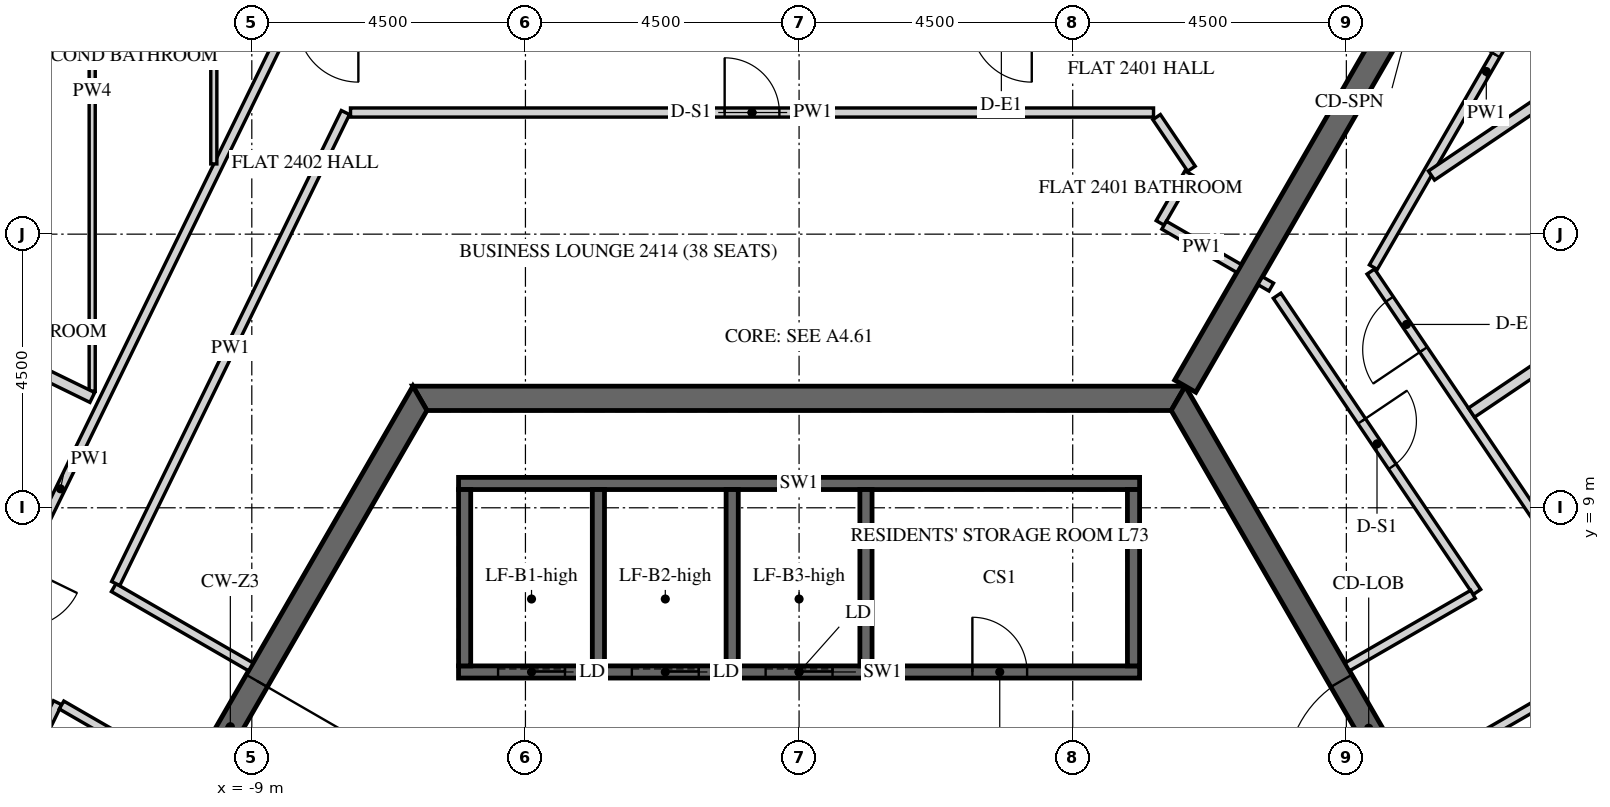
"""IFC4 building model, lengths in metres.
Left out: names, types, materials, properties, quantities, classifications, styles, units other than length and angle.
Written with IfcOpenShell. Run it as: python <this file> out.ifc"""

import sys

from ifc_helpers import new_model, si_unit, direction, frame, frame_2d, origin, place, context, subcontext, project, spatial, polyline, rectangle, outline, extrude, element, fill, save


model = new_model("IFC4")
c1 = context("Model", 3, precision=1e-05, world=origin(), true_north=direction((0.0, 1.0)))
c2 = subcontext(c1, "Body", "Model", "MODEL_VIEW")
j1 = project(units=[si_unit("LENGTHUNIT", "METRE"), si_unit("PLANEANGLEUNIT", "RADIAN")], contexts=[c1])
p1 = place(None, origin())
s1 = spatial("IfcSite", under=j1, at=p1, CompositionType="ELEMENT")
p2 = place(p1, origin())
s2 = spatial("IfcBuilding", under=s1, at=p2, CompositionType="ELEMENT")
p3 = place(p2, frame((0.0, 0.0, 303.0)))
s3 = spatial("IfcBuildingStorey", under=s2, at=p3, CompositionType="ELEMENT", Elevation=303.0)
p4 = place(p3, frame((-6.235, 10.8, -0.15), z_axis=(0.0, 0.0, 1.0), x_axis=(-0.499996419489, -0.866027470984, 0.0)))
e1 = element("IfcWall", 1, at=p4, inside=s3, PredefinedType="SHEAR", context=c2, shape_type="SweptSolid", body=[
    extrude(outline(polyline([(-0.115, -0.2), (12.586, -0.2), (12.355, 0.2), (0.115, 0.2), (-0.115, -0.2)])), origin(), (0.0, 0.0, 1.0), 3.9),
])
p5 = place(p4, frame((5.364, 0.0, 0.15)))
e2 = element("IfcOpeningElement", 2, at=p5, cuts=e1, PredefinedType="OPENING", context=c2, shape_type="SweptSolid", body=[
    extrude(rectangle(XDim=1.8, YDim=2.4, at=frame_2d((0.9, 1.2))), frame((0.0, 0.21, 0.0), z_axis=(0.0, -1.0, 0.0), x_axis=(1.0, 0.0, 0.0)), (0.0, 0.0, 1.0), 0.42),
])
p6 = place(p3, frame((12.471, 0.0, -0.15), z_axis=(0.0, 0.0, 1.0), x_axis=(-0.499996419489, 0.866027470984, 0.0)))
e3 = element("IfcWall", 3, at=p6, inside=s3, PredefinedType="SHEAR", context=c2, shape_type="SweptSolid", body=[
    extrude(outline(polyline([(-0.115, -0.2), (12.586, -0.2), (12.355, 0.2), (0.115, 0.2), (-0.115, -0.2)])), origin(), (0.0, 0.0, 1.0), 3.9),
])
p7 = place(p6, frame((5.306, 0.0, 0.15)))
e4 = element("IfcOpeningElement", 4, at=p7, cuts=e3, PredefinedType="OPENING", context=c2, shape_type="SweptSolid", body=[
    extrude(rectangle(XDim=1.8, YDim=2.4, at=frame_2d((0.9, 1.2))), frame((0.0, 0.21, 0.0), z_axis=(0.0, -1.0, 0.0), x_axis=(1.0, 0.0, 0.0)), (0.0, 0.0, 1.0), 0.42),
])
p8 = place(p3, frame((6.235, 10.8, -0.15), z_axis=(0.0, 0.0, 1.0), x_axis=(-1.0, 0.0, 0.0)))
e5 = element("IfcWall", 5, at=p8, inside=s3, PredefinedType="SHEAR", context=c2, shape_type="SweptSolid", body=[
    extrude(outline(polyline([(-0.115, -0.2), (12.586, -0.2), (12.355, 0.2), (0.115, 0.2), (-0.115, -0.2)])), origin(), (0.0, 0.0, 1.0), 3.9),
])
p9 = place(p3, frame((6.351, 11.0, -0.15), z_axis=(0.0, 0.0, 1.0), x_axis=(0.499998894578, 0.866026041999, 0.0)))
e6 = element("IfcWall", 6, at=p9, inside=s3, PredefinedType="SHEAR", context=c2, shape_type="SweptSolid", body=[
    extrude(rectangle(XDim=15.544, YDim=0.4, at=frame_2d((7.772, 0.0))), origin(), (0.0, 0.0, 1.0), 3.9),
])
p10 = place(p9, frame((6.872, 0.0, 0.15)))
e7 = element("IfcOpeningElement", 7, at=p10, cuts=e6, PredefinedType="OPENING", context=c2, shape_type="SweptSolid", body=[
    extrude(rectangle(XDim=1.8, YDim=2.4, at=frame_2d((0.9, 1.2))), frame((0.0, 0.21, 0.0), z_axis=(0.0, -1.0, 0.0), x_axis=(1.0, 0.0, 0.0)), (0.0, 0.0, 1.0), 0.42),
])
p11 = place(p3, frame((-5.6, 6.3, -0.25), z_axis=(0.0, 0.0, 1.0), x_axis=(1.0, 0.0, 0.0)))
e8 = element("IfcWall", 8, at=p11, inside=s3, PredefinedType="SHEAR", context=c2, shape_type="SweptSolid", body=[
    extrude(rectangle(XDim=11.2, YDim=0.2, at=frame_2d((5.6, 0.0))), origin(), (0.0, 0.0, 1.0), 3.9),
])
p12 = place(p11, frame((8.45, 0.0, 0.25)))
e9 = element("IfcOpeningElement", 9, at=p12, cuts=e8, PredefinedType="OPENING", context=c2, shape_type="SweptSolid", body=[
    extrude(rectangle(XDim=0.9, YDim=2.1, at=frame_2d((0.45, 1.05))), frame((0.0, 0.11, 0.0), z_axis=(0.0, -1.0, 0.0), x_axis=(1.0, 0.0, 0.0)), (0.0, 0.0, 1.0), 0.22),
])
p13 = place(p11, frame((0.65, 0.0, 0.25)))
e10 = element("IfcOpeningElement", 10, at=p13, cuts=e8, PredefinedType="OPENING", context=c2, shape_type="SweptSolid", body=[
    extrude(rectangle(XDim=1.1, YDim=2.1, at=frame_2d((0.55, 1.05))), frame((0.0, 0.11, 0.0), z_axis=(0.0, -1.0, 0.0), x_axis=(1.0, 0.0, 0.0)), (0.0, 0.0, 1.0), 0.22),
])
p14 = place(p11, frame((2.85, 0.0, 0.25)))
e11 = element("IfcOpeningElement", 11, at=p14, cuts=e8, PredefinedType="OPENING", context=c2, shape_type="SweptSolid", body=[
    extrude(rectangle(XDim=1.1, YDim=2.1, at=frame_2d((0.55, 1.05))), frame((0.0, 0.11, 0.0), z_axis=(0.0, -1.0, 0.0), x_axis=(1.0, 0.0, 0.0)), (0.0, 0.0, 1.0), 0.22),
])
p15 = place(p11, frame((5.05, 0.0, 0.25)))
e12 = element("IfcOpeningElement", 12, at=p15, cuts=e8, PredefinedType="OPENING", context=c2, shape_type="SweptSolid", body=[
    extrude(rectangle(XDim=1.1, YDim=2.1, at=frame_2d((0.55, 1.05))), frame((0.0, 0.11, 0.0), z_axis=(0.0, -1.0, 0.0), x_axis=(1.0, 0.0, 0.0)), (0.0, 0.0, 1.0), 0.22),
])
p16 = place(p3, frame((-5.6, 9.4, -0.25), z_axis=(0.0, 0.0, 1.0), x_axis=(1.0, 0.0, 0.0)))
e13 = element("IfcWall", 13, at=p16, inside=s3, PredefinedType="SHEAR", context=c2, shape_type="SweptSolid", body=[
    extrude(rectangle(XDim=11.2, YDim=0.2, at=frame_2d((5.6, 0.0))), origin(), (0.0, 0.0, 1.0), 3.9),
])
for number, where, z_axis, x_axis in (
    (14, (-5.5, 6.4, -0.25), (0.0, 0.0, 1.0), (0.0, 1.0, 0.0)),
    (15, (-3.3, 6.4, -0.25), (0.0, 0.0, 1.0), (0.0, 1.0, 0.0)),
    (16, (-1.1, 6.4, -0.25), (0.0, 0.0, 1.0), (0.0, 1.0, 0.0)),
    (17, (1.1, 6.4, -0.25), (0.0, 0.0, 1.0), (0.0, 1.0, 0.0)),
    (18, (5.5, 6.4, -0.25), (0.0, 0.0, 1.0), (0.0, 1.0, 0.0)),
):
    element("IfcWall", number, at=place(p3, frame(where, z_axis=z_axis, x_axis=x_axis)), inside=s3, PredefinedType="SHEAR", context=c2, shape_type="SweptSolid", body=[
        extrude(rectangle(XDim=2.9, YDim=0.2, at=frame_2d((1.45, 0.0))), origin(), (0.0, 0.0, 1.0), 3.9),
    ])
p17 = place(p3, frame((-8.434, 16.925, 0.0), z_axis=(0.0, 0.0, 1.0), x_axis=(-0.438371383278, -0.898793930956, 0.0)))
e19 = element("IfcWall", 19, at=p17, inside=s3, PredefinedType="PARTITIONING", context=c2, shape_type="SweptSolid", body=[
    extrude(rectangle(XDim=16.939, YDim=0.15, at=frame_2d((8.47, 0.0))), origin(), (0.0, 0.0, 1.0), 2.988),
])
p18 = place(p17, frame((9.89, 0.0, 0.0)))
e20 = element("IfcOpeningElement", 20, at=p18, cuts=e19, PredefinedType="OPENING", context=c2, shape_type="SweptSolid", body=[
    extrude(rectangle(XDim=1.0, YDim=2.1, at=frame_2d((0.5, 1.05))), frame((0.0, 0.085, 0.0), z_axis=(0.0, -1.0, 0.0), x_axis=(1.0, 0.0, 0.0)), (0.0, 0.0, 1.0), 0.17),
])
p19 = place(p3, frame((-9.016, 6.384, 0.0), z_axis=(0.0, 0.0, 1.0), x_axis=(-0.866031051173, 0.499990218309, 0.0)))
e21 = element("IfcWall", 21, at=p19, inside=s3, PredefinedType="PARTITIONING", context=c2, shape_type="SweptSolid", body=[
    extrude(rectangle(XDim=2.604, YDim=0.15, at=frame_2d((1.302, 0.0))), origin(), (0.0, 0.0, 1.0), 2.988),
])
p20 = place(p3, frame((-11.238, 7.754, 0.0), z_axis=(0.0, 0.0, 1.0), x_axis=(0.438387352899, 0.89878614187, 0.0)))
e22 = element("IfcWall", 22, at=p20, inside=s3, PredefinedType="PARTITIONING", context=c2, shape_type="SweptSolid", body=[
    extrude(rectangle(XDim=8.618, YDim=0.15, at=frame_2d((4.309, 0.0))), origin(), (0.0, 0.0, 1.0), 2.988),
])
p21 = place(p3, frame((-7.377, 15.5, 0.0), z_axis=(0.0, 0.0, 1.0), x_axis=(1.0, 0.0, 0.0)))
e23 = element("IfcWall", 23, at=p21, inside=s3, PredefinedType="PARTITIONING", context=c2, shape_type="SweptSolid", body=[
    extrude(rectangle(XDim=13.206, YDim=0.15, at=frame_2d((6.603, 0.0))), origin(), (0.0, 0.0, 1.0), 2.988),
])
p22 = place(p21, frame((6.153, 0.0, 0.0)))
e24 = element("IfcOpeningElement", 24, at=p22, cuts=e23, PredefinedType="OPENING", context=c2, shape_type="SweptSolid", body=[
    extrude(rectangle(XDim=0.9, YDim=2.1, at=frame_2d((0.45, 1.05))), frame((0.0, 0.085, 0.0), z_axis=(0.0, -1.0, 0.0), x_axis=(1.0, 0.0, 0.0)), (0.0, 0.0, 1.0), 0.17),
])
p23 = place(p3, frame((5.88, 15.425, 0.0), z_axis=(0.0, 0.0, 1.0), x_axis=(0.559202631314, -0.829031010959, 0.0)))
e25 = element("IfcWall", 25, at=p23, inside=s3, PredefinedType="PARTITIONING", context=c2, shape_type="SweptSolid", body=[
    extrude(rectangle(XDim=1.024, YDim=0.15, at=frame_2d((0.512, 0.0))), origin(), (0.0, 0.0, 1.0), 2.988),
])
p24 = place(p3, frame((6.411, 14.504, 0.0), z_axis=(0.0, 0.0, 1.0), x_axis=(-0.499998034377, -0.866026538634, 0.0)))
e26 = element("IfcWall", 26, at=p24, inside=s3, PredefinedType="PARTITIONING", context=c2, shape_type="SweptSolid", body=[
    extrude(rectangle(XDim=0.946, YDim=0.15, at=frame_2d((0.473, 0.0))), origin(), (0.0, 0.0, 1.0), 2.988),
])
p25 = place(p3, frame((6.003, 13.647, 0.0), z_axis=(0.0, 0.0, 1.0), x_axis=(0.865988727248, -0.500063520245, 0.0)))
e27 = element("IfcWall", 27, at=p25, inside=s3, PredefinedType="PARTITIONING", context=c2, shape_type="SweptSolid", body=[
    extrude(rectangle(XDim=1.425, YDim=0.15, at=frame_2d((0.712, 0.0))), origin(), (0.0, 0.0, 1.0), 2.988),
])
p26 = place(p3, frame((-14.745, 0.564, 0.0), z_axis=(0.0, 0.0, 1.0), x_axis=(0.438348416625, 0.898805132185, 0.0)))
e28 = element("IfcWall", 28, at=p26, inside=s3, PredefinedType="PARTITIONING", context=c2, shape_type="SweptSolid", body=[
    extrude(rectangle(XDim=5.82, YDim=0.15, at=frame_2d((2.91, 0.0))), origin(), (0.0, 0.0, 1.0), 2.988),
])
p27 = place(p26, frame((2.46, 0.0, 0.0)))
e29 = element("IfcOpeningElement", 29, at=p27, cuts=e28, PredefinedType="OPENING", context=c2, shape_type="SweptSolid", body=[
    extrude(rectangle(XDim=0.9, YDim=2.1, at=frame_2d((0.45, 1.05))), frame((0.0, 0.085, 0.0), z_axis=(0.0, -1.0, 0.0), x_axis=(1.0, 0.0, 0.0)), (0.0, 0.0, 1.0), 0.17),
])
p28 = place(p3, frame((-12.129, 5.757, 0.0), z_axis=(0.0, 0.0, 1.0), x_axis=(0.866033707122, -0.499985617921, 0.0)))
e30 = element("IfcWall", 30, at=p28, inside=s3, PredefinedType="PARTITIONING", context=c2, shape_type="SweptSolid", body=[
    extrude(rectangle(XDim=2.382, YDim=0.15, at=frame_2d((1.191, 0.0))), origin(), (0.0, 0.0, 1.0), 2.988),
])
p29 = place(p3, frame((18.875, -1.158, 0.0), z_axis=(0.0, 0.0, 1.0), x_axis=(-0.55919880344, 0.829033592945, 0.0)))
e31 = element("IfcWall", 31, at=p29, inside=s3, PredefinedType="PARTITIONING", context=c2, shape_type="SweptSolid", body=[
    extrude(rectangle(XDim=16.939, YDim=0.15, at=frame_2d((8.47, 0.0))), origin(), (0.0, 0.0, 1.0), 2.988),
])
p30 = place(p29, frame((4.09, 0.0, 0.0)))
e32 = element("IfcOpeningElement", 32, at=p30, cuts=e31, PredefinedType="OPENING", context=c2, shape_type="SweptSolid", body=[
    extrude(rectangle(XDim=1.0, YDim=2.1, at=frame_2d((0.5, 1.05))), frame((0.0, 0.085, 0.0), z_axis=(0.0, -1.0, 0.0), x_axis=(1.0, 0.0, 0.0)), (0.0, 0.0, 1.0), 0.17),
])
p31 = place(p29, frame((15.39, 0.0, 0.0)))
e33 = element("IfcOpeningElement", 33, at=p31, cuts=e31, PredefinedType="OPENING", context=c2, shape_type="SweptSolid", body=[
    extrude(rectangle(XDim=1.0, YDim=2.1, at=frame_2d((0.5, 1.05))), frame((0.0, 0.085, 0.0), z_axis=(0.0, -1.0, 0.0), x_axis=(1.0, 0.0, 0.0)), (0.0, 0.0, 1.0), 0.17),
])
p32 = place(p3, frame((9.444, 12.957, 0.0), z_axis=(0.0, 0.0, 1.0), x_axis=(0.500004967958, 0.866022535513, 0.0)))
e34 = element("IfcWall", 34, at=p32, inside=s3, PredefinedType="PARTITIONING", context=c2, shape_type="SweptSolid", body=[
    extrude(rectangle(XDim=7.431, YDim=0.15, at=frame_2d((3.715, 0.0))), origin(), (0.0, 0.0, 1.0), 2.988),
])
p33 = place(p32, frame((4.03, 0.0, 0.0)))
e35 = element("IfcOpeningElement", 35, at=p33, cuts=e34, PredefinedType="OPENING", context=c2, shape_type="SweptSolid", body=[
    extrude(rectangle(XDim=1.0, YDim=2.1, at=frame_2d((0.5, 1.05))), frame((0.0, 0.085, 0.0), z_axis=(0.0, -1.0, 0.0), x_axis=(1.0, 0.0, 0.0)), (0.0, 0.0, 1.0), 0.17),
])
p34 = place(p3, frame((10.066, 4.566, 0.0), z_axis=(0.0, 0.0, 1.0), x_axis=(0.866034402474, 0.499984413489, 0.0)))
e36 = element("IfcWall", 36, at=p34, inside=s3, PredefinedType="PARTITIONING", context=c2, shape_type="SweptSolid", body=[
    extrude(rectangle(XDim=2.608, YDim=0.15, at=frame_2d((1.304, 0.0))), origin(), (0.0, 0.0, 1.0), 2.988),
])
p35 = place(p3, frame((7.583, 12.735, 0.0), z_axis=(0.0, 0.0, 1.0), x_axis=(0.866088799389, -0.499890179513, 0.0)))
e37 = element("IfcWall", 37, at=p35, inside=s3, PredefinedType="PARTITIONING", context=c2, shape_type="SweptSolid", body=[
    extrude(rectangle(XDim=0.21, YDim=0.15, at=frame_2d((0.105, 0.0))), origin(), (0.0, 0.0, 1.0), 2.988),
])
p36 = place(p3, frame((7.861, 12.488, 0.0), z_axis=(0.0, 0.0, 1.0), x_axis=(0.559178186788, -0.829047498893, 0.0)))
e38 = element("IfcWall", 38, at=p36, inside=s3, PredefinedType="PARTITIONING", context=c2, shape_type="SweptSolid", body=[
    extrude(rectangle(XDim=5.878, YDim=0.15, at=frame_2d((2.939, 0.0))), origin(), (0.0, 0.0, 1.0), 2.988),
])
p37 = place(p36, frame((2.489, 0.0, 0.0)))
e39 = element("IfcOpeningElement", 39, at=p37, cuts=e38, PredefinedType="OPENING", context=c2, shape_type="SweptSolid", body=[
    extrude(rectangle(XDim=0.9, YDim=2.1, at=frame_2d((0.45, 1.05))), frame((0.0, 0.085, 0.0), z_axis=(0.0, -1.0, 0.0), x_axis=(1.0, 0.0, 0.0)), (0.0, 0.0, 1.0), 0.17),
])
p38 = place(p3, frame((11.082, 7.578, 0.0), z_axis=(0.0, 0.0, 1.0), x_axis=(-0.865993065409, -0.500056007527, 0.0)))
e40 = element("IfcWall", 40, at=p38, inside=s3, PredefinedType="PARTITIONING", context=c2, shape_type="SweptSolid", body=[
    extrude(rectangle(XDim=2.386, YDim=0.15, at=frame_2d((1.193, 0.0))), origin(), (0.0, 0.0, 1.0), 2.988),
])
p39 = place(p3, frame((-11.625, 10.915, 0.0), z_axis=(0.0, 0.0, 1.0), x_axis=(0.0, 1.0, 0.0)))
e41 = element("IfcWall", 41, at=p39, inside=s3, PredefinedType="PARTITIONING", context=c2, shape_type="SweptSolid", body=[
    extrude(rectangle(XDim=9.885, YDim=0.1, at=frame_2d((4.942, 0.0))), origin(), (0.0, 0.0, 1.0), 2.988),
])
p40 = place(p3, frame((-19.094, 14.458, 0.0), z_axis=(0.0, 0.0, 1.0), x_axis=(0.898789332666, -0.438380811038, 0.0)))
e42 = element("IfcWall", 42, at=p40, inside=s3, PredefinedType="PARTITIONING", context=c2, shape_type="SweptSolid", body=[
    extrude(rectangle(XDim=8.312, YDim=0.18, at=frame_2d((4.156, 0.0))), origin(), (0.0, 0.0, 1.0), 2.988),
])
p41 = place(p3, frame((-9.625, 20.8, 0.0), z_axis=(0.0, 0.0, 1.0), x_axis=(0.0, -1.0, 0.0)))
e43 = element("IfcWall", 43, at=p41, inside=s3, PredefinedType="PARTITIONING", context=c2, shape_type="SweptSolid", body=[
    extrude(rectangle(XDim=6.145, YDim=0.1, at=frame_2d((3.073, 0.0))), origin(), (0.0, 0.0, 1.0), 2.988),
])
p42 = place(p41, frame((1.5, 0.0, 0.0)))
e44 = element("IfcOpeningElement", 44, at=p42, cuts=e43, PredefinedType="OPENING", context=c2, shape_type="SweptSolid", body=[
    extrude(rectangle(XDim=0.8, YDim=2.1, at=frame_2d((0.4, 1.05))), frame((0.0, 0.06, 0.0), z_axis=(0.0, -1.0, 0.0), x_axis=(1.0, 0.0, 0.0)), (0.0, 0.0, 1.0), 0.12),
])
p43 = place(p3, frame((18.042, 15.276, 0.0), z_axis=(0.0, 0.0, 1.0), x_axis=(-0.829037762759, -0.559192621481, 0.0)))
e45 = element("IfcWall", 45, at=p43, inside=s3, PredefinedType="PARTITIONING", context=c2, shape_type="SweptSolid", body=[
    extrude(rectangle(XDim=8.425, YDim=0.18, at=frame_2d((4.212, 0.0))), origin(), (0.0, 0.0, 1.0), 2.988),
])
p44 = place(p3, frame((16.029, 18.26, 0.0), z_axis=(0.0, 0.0, 1.0), x_axis=(-0.82904538001, -0.559181328268, 0.0)))
e46 = element("IfcWall", 46, at=p44, inside=s3, PredefinedType="PARTITIONING", context=c2, shape_type="SweptSolid", body=[
    extrude(rectangle(XDim=6.79, YDim=0.18, at=frame_2d((3.395, 0.0))), origin(), (0.0, 0.0, 1.0), 2.988),
])
p45 = place(p5, origin())
e47 = element("IfcDoor", 47, at=p45, inside=s3, OperationType="DOUBLE_DOOR_SINGLE_SWING", PredefinedType="DOOR", context=c2, shape_type="SweptSolid", body=[
    extrude(rectangle(XDim=1.8, YDim=2.4, at=frame_2d((0.9, 1.2))), frame((0.0, 0.025, 0.0), z_axis=(0.0, -1.0, 0.0), x_axis=(1.0, 0.0, 0.0)), (0.0, 0.0, 1.0), 0.05),
])
fill(e2, e47)
p46 = place(p7, origin())
e48 = element("IfcDoor", 48, at=p46, inside=s3, OperationType="DOUBLE_DOOR_SINGLE_SWING", PredefinedType="DOOR", context=c2, shape_type="SweptSolid", body=[
    extrude(rectangle(XDim=1.8, YDim=2.4, at=frame_2d((0.9, 1.2))), frame((0.0, 0.025, 0.0), z_axis=(0.0, -1.0, 0.0), x_axis=(1.0, 0.0, 0.0)), (0.0, 0.0, 1.0), 0.05),
])
fill(e4, e48)
p47 = place(p12, origin())
e49 = element("IfcDoor", 49, at=p47, inside=s3, OperationType="SINGLE_SWING_LEFT", PredefinedType="DOOR", context=c2, shape_type="SweptSolid", body=[
    extrude(rectangle(XDim=0.9, YDim=2.1, at=frame_2d((0.45, 1.05))), frame((0.0, 0.025, 0.0), z_axis=(0.0, -1.0, 0.0), x_axis=(1.0, 0.0, 0.0)), (0.0, 0.0, 1.0), 0.05),
])
fill(e9, e49)
p48 = place(p13, origin())
e50 = element("IfcDoor", 50, at=p48, inside=s3, OperationType="SLIDING_TO_LEFT", PredefinedType="DOOR", context=c2, shape_type="SweptSolid", body=[
    extrude(rectangle(XDim=1.1, YDim=2.1, at=frame_2d((0.55, 1.05))), frame((0.0, 0.025, 0.0), z_axis=(0.0, -1.0, 0.0), x_axis=(1.0, 0.0, 0.0)), (0.0, 0.0, 1.0), 0.05),
])
fill(e10, e50)
p49 = place(p14, origin())
e51 = element("IfcDoor", 51, at=p49, inside=s3, OperationType="SLIDING_TO_LEFT", PredefinedType="DOOR", context=c2, shape_type="SweptSolid", body=[
    extrude(rectangle(XDim=1.1, YDim=2.1, at=frame_2d((0.55, 1.05))), frame((0.0, 0.025, 0.0), z_axis=(0.0, -1.0, 0.0), x_axis=(1.0, 0.0, 0.0)), (0.0, 0.0, 1.0), 0.05),
])
fill(e11, e51)
p50 = place(p15, origin())
e52 = element("IfcDoor", 52, at=p50, inside=s3, OperationType="SLIDING_TO_LEFT", PredefinedType="DOOR", context=c2, shape_type="SweptSolid", body=[
    extrude(rectangle(XDim=1.1, YDim=2.1, at=frame_2d((0.55, 1.05))), frame((0.0, 0.025, 0.0), z_axis=(0.0, -1.0, 0.0), x_axis=(1.0, 0.0, 0.0)), (0.0, 0.0, 1.0), 0.05),
])
fill(e12, e52)
p51 = place(p31, origin())
e53 = element("IfcDoor", 53, at=p51, inside=s3, OperationType="SINGLE_SWING_LEFT", PredefinedType="DOOR", context=c2, shape_type="SweptSolid", body=[
    extrude(rectangle(XDim=1.0, YDim=2.1, at=frame_2d((0.5, 1.05))), frame((0.0, 0.025, 0.0), z_axis=(0.0, -1.0, 0.0), x_axis=(1.0, 0.0, 0.0)), (0.0, 0.0, 1.0), 0.05),
])
fill(e33, e53)
p52 = place(p33, origin())
e54 = element("IfcDoor", 54, at=p52, inside=s3, OperationType="SINGLE_SWING_RIGHT", PredefinedType="DOOR", context=c2, shape_type="SweptSolid", body=[
    extrude(rectangle(XDim=1.0, YDim=2.1, at=frame_2d((0.5, 1.05))), frame((0.0, 0.025, 0.0), z_axis=(0.0, -1.0, 0.0), x_axis=(1.0, 0.0, 0.0)), (0.0, 0.0, 1.0), 0.05),
])
fill(e35, e54)
p53 = place(p22, origin())
e55 = element("IfcDoor", 55, at=p53, inside=s3, OperationType="SINGLE_SWING_LEFT", PredefinedType="DOOR", context=c2, shape_type="SweptSolid", body=[
    extrude(rectangle(XDim=0.9, YDim=2.1, at=frame_2d((0.45, 1.05))), frame((0.0, 0.025, 0.0), z_axis=(0.0, -1.0, 0.0), x_axis=(1.0, 0.0, 0.0)), (0.0, 0.0, 1.0), 0.05),
])
fill(e24, e55)
p54 = place(p37, origin())
e56 = element("IfcDoor", 56, at=p54, inside=s3, OperationType="SINGLE_SWING_RIGHT", PredefinedType="DOOR", context=c2, shape_type="SweptSolid", body=[
    extrude(rectangle(XDim=0.9, YDim=2.1, at=frame_2d((0.45, 1.05))), frame((0.0, 0.025, 0.0), z_axis=(0.0, -1.0, 0.0), x_axis=(1.0, 0.0, 0.0)), (0.0, 0.0, 1.0), 0.05),
])
fill(e39, e56)
save(model, sys.argv[1])
